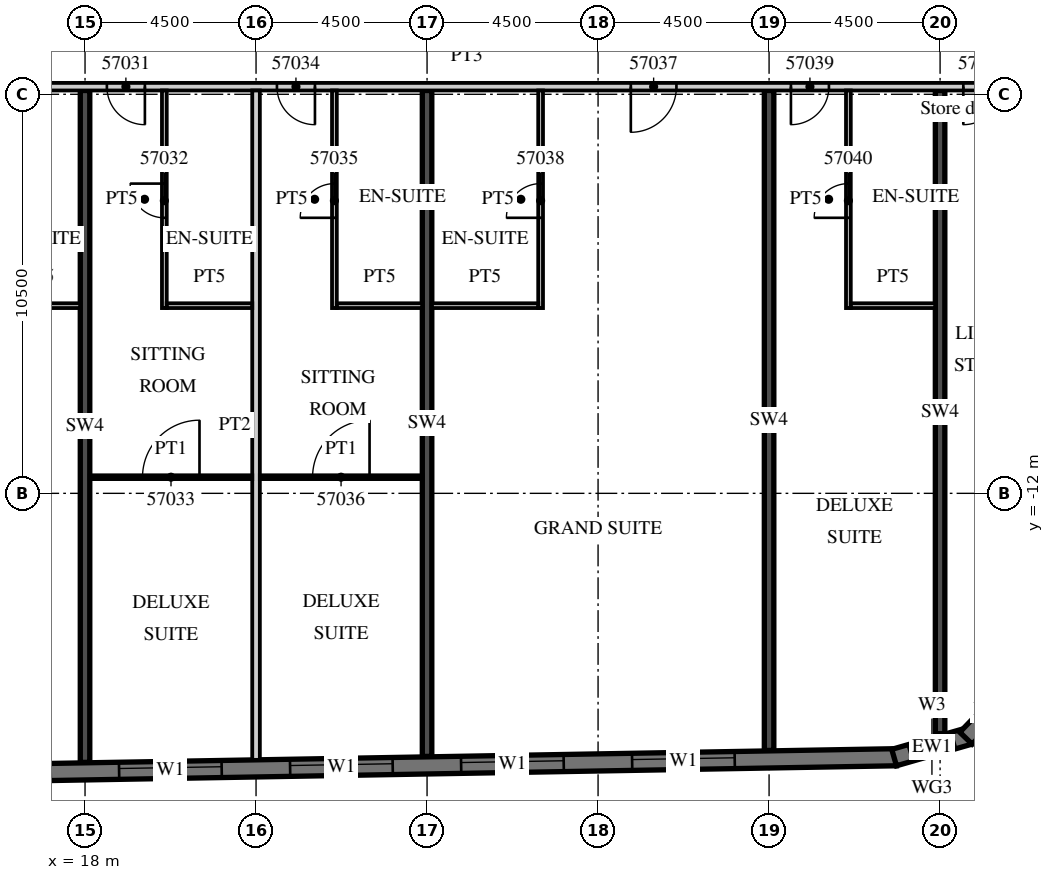
"""IFC4 building model, lengths in metres.
Left out: names, types, materials, properties, quantities, classifications, styles, units other than length and angle.
Written with IfcOpenShell. Run it as: python <this file> out.ifc"""

import sys

from ifc_helpers import new_model, si_unit, direction, frame, frame_2d, origin, place, context, subcontext, project, spatial, polyline, rectangle, outline, extrude, element, fill, save


model = new_model("IFC4")
c1 = context("Model", 3, precision=1e-05, world=origin(), true_north=direction((0.0, 1.0)))
c2 = subcontext(c1, "Body", "Model", "MODEL_VIEW")
j1 = project(units=[si_unit("LENGTHUNIT", "METRE"), si_unit("PLANEANGLEUNIT", "RADIAN")], contexts=[c1])
p1 = place(None, origin())
s1 = spatial("IfcSite", under=j1, at=p1, CompositionType="ELEMENT")
p2 = place(p1, origin())
s2 = spatial("IfcBuilding", under=s1, at=p2, CompositionType="ELEMENT")
p3 = place(p2, frame((0.0, 0.0, 234.2)))
s3 = spatial("IfcBuildingStorey", under=s2, at=p3, CompositionType="ELEMENT", Elevation=234.2)
p4 = place(p3, frame((18.0, -19.079, 0.0), z_axis=(0.0, 0.0, 1.0), x_axis=(0.0, 1.0, 0.0)))
e1 = element("IfcWall", 1, at=p4, inside=s3, PredefinedType="SHEAR", context=c2, shape_type="SweptSolid", body=[
    extrude(rectangle(XDim=17.679, YDim=0.25, at=frame_2d((8.84, 0.0))), origin(), (0.0, 0.0, 1.0), 3.3),
])
p5 = place(p3, frame((27.0, -18.922, 0.0), z_axis=(0.0, 0.0, 1.0), x_axis=(0.0, 1.0, 0.0)))
e2 = element("IfcWall", 2, at=p5, inside=s3, PredefinedType="SHEAR", context=c2, shape_type="SweptSolid", body=[
    extrude(rectangle(XDim=17.522, YDim=0.25, at=frame_2d((8.761, 0.0))), origin(), (0.0, 0.0, 1.0), 3.3),
])
p6 = place(p3, frame((36.0, -18.765, 0.0), z_axis=(0.0, 0.0, 1.0), x_axis=(0.0, 1.0, 0.0)))
e3 = element("IfcWall", 3, at=p6, inside=s3, PredefinedType="SHEAR", context=c2, shape_type="SweptSolid", body=[
    extrude(rectangle(XDim=17.365, YDim=0.25, at=frame_2d((8.683, 0.0))), origin(), (0.0, 0.0, 1.0), 3.3),
])
p7 = place(p3, frame((40.5, -18.325, 0.0), z_axis=(0.0, 0.0, 1.0), x_axis=(0.0, 1.0, 0.0)))
e4 = element("IfcWall", 4, at=p7, inside=s3, PredefinedType="SHEAR", context=c2, shape_type="SweptSolid", body=[
    extrude(rectangle(XDim=16.925, YDim=0.25, at=frame_2d((8.463, 0.0))), origin(), (0.0, 0.0, 1.0), 3.3),
])
p8 = place(p3, frame((-13.504, -19.866, 0.0), z_axis=(0.0, 0.0, 1.0), x_axis=(0.999847672978, 0.017453676992, 0.0)))
e5 = element("IfcWall", 5, at=p8, inside=s3, PredefinedType="SOLIDWALL", context=c2, shape_type="SweptSolid", body=[
    extrude(rectangle(XDim=52.86, YDim=0.45, at=frame_2d((26.43, 0.0))), origin(), (0.0, 0.0, 1.0), 3.02),
])
p9 = place(p8, frame((0.9, 0.0, 0.45)))
e6 = element("IfcOpeningElement", 6, at=p9, cuts=e5, PredefinedType="OPENING", context=c2, shape_type="SweptSolid", body=[
    extrude(rectangle(XDim=2.7, YDim=2.25, at=frame_2d((1.35, 1.125))), frame((0.0, 0.235, 0.0), z_axis=(0.0, -1.0, 0.0), x_axis=(1.0, 0.0, 0.0)), (0.0, 0.0, 1.0), 0.47),
])
p10 = place(p8, frame((5.401, 0.0, 0.45)))
e7 = element("IfcOpeningElement", 7, at=p10, cuts=e5, PredefinedType="OPENING", context=c2, shape_type="SweptSolid", body=[
    extrude(rectangle(XDim=2.7, YDim=2.25, at=frame_2d((1.35, 1.125))), frame((0.0, 0.235, 0.0), z_axis=(0.0, -1.0, 0.0), x_axis=(1.0, 0.0, 0.0)), (0.0, 0.0, 1.0), 0.47),
])
p11 = place(p8, frame((9.902, 0.0, 0.45)))
e8 = element("IfcOpeningElement", 8, at=p11, cuts=e5, PredefinedType="OPENING", context=c2, shape_type="SweptSolid", body=[
    extrude(rectangle(XDim=2.7, YDim=2.25, at=frame_2d((1.35, 1.125))), frame((0.0, 0.235, 0.0), z_axis=(0.0, -1.0, 0.0), x_axis=(1.0, 0.0, 0.0)), (0.0, 0.0, 1.0), 0.47),
])
p12 = place(p8, frame((14.402, 0.0, 0.45)))
e9 = element("IfcOpeningElement", 9, at=p12, cuts=e5, PredefinedType="OPENING", context=c2, shape_type="SweptSolid", body=[
    extrude(rectangle(XDim=2.7, YDim=2.25, at=frame_2d((1.35, 1.125))), frame((0.0, 0.235, 0.0), z_axis=(0.0, -1.0, 0.0), x_axis=(1.0, 0.0, 0.0)), (0.0, 0.0, 1.0), 0.47),
])
p13 = place(p8, frame((18.903, 0.0, 0.45)))
e10 = element("IfcOpeningElement", 10, at=p13, cuts=e5, PredefinedType="OPENING", context=c2, shape_type="SweptSolid", body=[
    extrude(rectangle(XDim=2.7, YDim=2.25, at=frame_2d((1.35, 1.125))), frame((0.0, 0.235, 0.0), z_axis=(0.0, -1.0, 0.0), x_axis=(1.0, 0.0, 0.0)), (0.0, 0.0, 1.0), 0.47),
])
p14 = place(p8, frame((23.404, 0.0, 0.45)))
e11 = element("IfcOpeningElement", 11, at=p14, cuts=e5, PredefinedType="OPENING", context=c2, shape_type="SweptSolid", body=[
    extrude(rectangle(XDim=2.7, YDim=2.25, at=frame_2d((1.35, 1.125))), frame((0.0, 0.235, 0.0), z_axis=(0.0, -1.0, 0.0), x_axis=(1.0, 0.0, 0.0)), (0.0, 0.0, 1.0), 0.47),
])
p15 = place(p8, frame((27.904, 0.0, 0.45)))
e12 = element("IfcOpeningElement", 12, at=p15, cuts=e5, PredefinedType="OPENING", context=c2, shape_type="SweptSolid", body=[
    extrude(rectangle(XDim=2.7, YDim=2.25, at=frame_2d((1.35, 1.125))), frame((0.0, 0.235, 0.0), z_axis=(0.0, -1.0, 0.0), x_axis=(1.0, 0.0, 0.0)), (0.0, 0.0, 1.0), 0.47),
])
p16 = place(p8, frame((32.405, 0.0, 0.45)))
e13 = element("IfcOpeningElement", 13, at=p16, cuts=e5, PredefinedType="OPENING", context=c2, shape_type="SweptSolid", body=[
    extrude(rectangle(XDim=2.7, YDim=2.25, at=frame_2d((1.35, 1.125))), frame((0.0, 0.235, 0.0), z_axis=(0.0, -1.0, 0.0), x_axis=(1.0, 0.0, 0.0)), (0.0, 0.0, 1.0), 0.47),
])
p17 = place(p8, frame((36.906, 0.0, 0.45)))
e14 = element("IfcOpeningElement", 14, at=p17, cuts=e5, PredefinedType="OPENING", context=c2, shape_type="SweptSolid", body=[
    extrude(rectangle(XDim=2.7, YDim=2.25, at=frame_2d((1.35, 1.125))), frame((0.0, 0.235, 0.0), z_axis=(0.0, -1.0, 0.0), x_axis=(1.0, 0.0, 0.0)), (0.0, 0.0, 1.0), 0.47),
])
p18 = place(p8, frame((41.406, 0.0, 0.45)))
e15 = element("IfcOpeningElement", 15, at=p18, cuts=e5, PredefinedType="OPENING", context=c2, shape_type="SweptSolid", body=[
    extrude(rectangle(XDim=2.7, YDim=2.25, at=frame_2d((1.35, 1.125))), frame((0.0, 0.235, 0.0), z_axis=(0.0, -1.0, 0.0), x_axis=(1.0, 0.0, 0.0)), (0.0, 0.0, 1.0), 0.47),
])
p19 = place(p8, frame((45.907, 0.0, 0.45)))
e16 = element("IfcOpeningElement", 16, at=p19, cuts=e5, PredefinedType="OPENING", context=c2, shape_type="SweptSolid", body=[
    extrude(rectangle(XDim=2.7, YDim=2.25, at=frame_2d((1.35, 1.125))), frame((0.0, 0.235, 0.0), z_axis=(0.0, -1.0, 0.0), x_axis=(1.0, 0.0, 0.0)), (0.0, 0.0, 1.0), 0.47),
])
p20 = place(p3, frame((39.29, -18.952, 0.0), z_axis=(0.0, 0.0, 1.0), x_axis=(0.961247584925, 0.275686562016, 0.0)))
e17 = element("IfcWall", 17, at=p20, inside=s3, PredefinedType="SOLIDWALL", context=c2, shape_type="SweptSolid", body=[
    extrude(outline(polyline([(0.0, -0.225), (2.071, -0.225), (1.95, 0.225), (0.121, 0.225), (0.0, -0.225)])), origin(), (0.0, 0.0, 1.0), 3.02),
])
p21 = place(p20, frame((0.435, 0.0, 0.45)))
e18 = element("IfcOpeningElement", 18, at=p21, cuts=e17, PredefinedType="OPENING", context=c2, shape_type="SweptSolid", body=[
    extrude(rectangle(XDim=1.2, YDim=2.25, at=frame_2d((0.6, 1.125))), frame((0.0, 0.235, 0.0), z_axis=(0.0, -1.0, 0.0), x_axis=(1.0, 0.0, 0.0)), (0.0, 0.0, 1.0), 0.47),
])
p22 = place(p3, frame((41.181, -18.442, 0.0), z_axis=(0.0, 0.0, 1.0), x_axis=(0.694678672846, 0.719320193998, 0.0)))
e19 = element("IfcWall", 19, at=p22, inside=s3, PredefinedType="SOLIDWALL", context=c2, shape_type="SweptSolid", body=[
    extrude(outline(polyline([(0.0, -0.225), (2.071, -0.225), (1.95, 0.225), (0.121, 0.225), (0.0, -0.225)])), origin(), (0.0, 0.0, 1.0), 3.02),
])
p23 = place(p3, frame((13.5, -1.3, 0.0), z_axis=(0.0, 0.0, 1.0), x_axis=(1.0, 0.0, 0.0)))
e20 = element("IfcWall", 20, at=p23, inside=s3, PredefinedType="PARTITIONING", context=c2, shape_type="SweptSolid", body=[
    extrude(rectangle(XDim=29.091, YDim=0.2, at=frame_2d((14.545, 0.0))), origin(), (0.0, 0.0, 1.0), 3.02),
])
p24 = place(p23, frame((0.575, 0.0, 0.0)))
e21 = element("IfcOpeningElement", 21, at=p24, cuts=e20, PredefinedType="OPENING", context=c2, shape_type="SweptSolid", body=[
    extrude(rectangle(XDim=1.0, YDim=2.1, at=frame_2d((0.5, 1.05))), frame((0.0, 0.11, 0.0), z_axis=(0.0, -1.0, 0.0), x_axis=(1.0, 0.0, 0.0)), (0.0, 0.0, 1.0), 0.22),
])
p25 = place(p23, frame((5.075, 0.0, 0.0)))
e22 = element("IfcOpeningElement", 22, at=p25, cuts=e20, PredefinedType="OPENING", context=c2, shape_type="SweptSolid", body=[
    extrude(rectangle(XDim=1.0, YDim=2.1, at=frame_2d((0.5, 1.05))), frame((0.0, 0.11, 0.0), z_axis=(0.0, -1.0, 0.0), x_axis=(1.0, 0.0, 0.0)), (0.0, 0.0, 1.0), 0.22),
])
p26 = place(p23, frame((9.55, 0.0, 0.0)))
e23 = element("IfcOpeningElement", 23, at=p26, cuts=e20, PredefinedType="OPENING", context=c2, shape_type="SweptSolid", body=[
    extrude(rectangle(XDim=1.0, YDim=2.1, at=frame_2d((0.5, 1.05))), frame((0.0, 0.11, 0.0), z_axis=(0.0, -1.0, 0.0), x_axis=(1.0, 0.0, 0.0)), (0.0, 0.0, 1.0), 0.22),
])
p27 = place(p23, frame((18.862, 0.0, 0.0)))
e24 = element("IfcOpeningElement", 24, at=p27, cuts=e20, PredefinedType="OPENING", context=c2, shape_type="SweptSolid", body=[
    extrude(rectangle(XDim=1.2, YDim=2.1, at=frame_2d((0.6, 1.05))), frame((0.0, 0.11, 0.0), z_axis=(0.0, -1.0, 0.0), x_axis=(1.0, 0.0, 0.0)), (0.0, 0.0, 1.0), 0.22),
])
p28 = place(p23, frame((23.075, 0.0, 0.0)))
e25 = element("IfcOpeningElement", 25, at=p28, cuts=e20, PredefinedType="OPENING", context=c2, shape_type="SweptSolid", body=[
    extrude(rectangle(XDim=1.0, YDim=2.1, at=frame_2d((0.5, 1.05))), frame((0.0, 0.11, 0.0), z_axis=(0.0, -1.0, 0.0), x_axis=(1.0, 0.0, 0.0)), (0.0, 0.0, 1.0), 0.22),
])
p29 = place(p23, frame((27.611, 0.0, 0.0)))
e26 = element("IfcOpeningElement", 26, at=p29, cuts=e20, PredefinedType="OPENING", context=c2, shape_type="SweptSolid", body=[
    extrude(rectangle(XDim=1.0, YDim=2.4, at=frame_2d((0.5, 1.2))), frame((0.0, 0.11, 0.0), z_axis=(0.0, -1.0, 0.0), x_axis=(1.0, 0.0, 0.0)), (0.0, 0.0, 1.0), 0.22),
])
p30 = place(p3, frame((15.625, -7.062, 0.0), z_axis=(0.0, 0.0, 1.0), x_axis=(1.0, 0.0, 0.0)))
e27 = element("IfcWall", 27, at=p30, inside=s3, PredefinedType="PARTITIONING", context=c2, shape_type="SweptSolid", body=[
    extrude(rectangle(XDim=2.25, YDim=0.125, at=frame_2d((1.125, 0.0))), origin(), (0.0, 0.0, 1.0), 3.02),
])
p31 = place(p3, frame((22.5, -19.013, 0.0), z_axis=(0.0, 0.0, 1.0), x_axis=(0.0, 1.0, 0.0)))
e28 = element("IfcWall", 28, at=p31, inside=s3, PredefinedType="PARTITIONING", context=c2, shape_type="SweptSolid", body=[
    extrude(rectangle(XDim=17.613, YDim=0.2, at=frame_2d((8.807, 0.0))), origin(), (0.0, 0.0, 1.0), 3.02),
])
p32 = place(p3, frame((20.087, -7.125, 0.0), z_axis=(0.0, 0.0, 1.0), x_axis=(0.0, 1.0, 0.0)))
e29 = element("IfcWall", 29, at=p32, inside=s3, PredefinedType="PARTITIONING", context=c2, shape_type="SweptSolid", body=[
    extrude(rectangle(XDim=5.725, YDim=0.125, at=frame_2d((2.863, 0.0))), origin(), (0.0, 0.0, 1.0), 3.02),
])
p33 = place(p32, frame((2.375, 0.0, 0.0)))
e30 = element("IfcOpeningElement", 30, at=p33, cuts=e29, PredefinedType="OPENING", context=c2, shape_type="SweptSolid", body=[
    extrude(rectangle(XDim=0.9, YDim=2.1, at=frame_2d((0.45, 1.05))), frame((0.0, 0.073, 0.0), z_axis=(0.0, -1.0, 0.0), x_axis=(1.0, 0.0, 0.0)), (0.0, 0.0, 1.0), 0.145),
])
p34 = place(p3, frame((20.15, -7.062, 0.0), z_axis=(0.0, 0.0, 1.0), x_axis=(1.0, 0.0, 0.0)))
e31 = element("IfcWall", 31, at=p34, inside=s3, PredefinedType="PARTITIONING", context=c2, shape_type="SweptSolid", body=[
    extrude(rectangle(XDim=2.25, YDim=0.125, at=frame_2d((1.125, 0.0))), origin(), (0.0, 0.0, 1.0), 3.02),
])
p35 = place(p3, frame((18.125, -11.575, 0.0), z_axis=(0.0, 0.0, 1.0), x_axis=(1.0, 0.0, 0.0)))
e32 = element("IfcWall", 32, at=p35, inside=s3, PredefinedType="PARTITIONING", context=c2, shape_type="SweptSolid", body=[
    extrude(rectangle(XDim=4.275, YDim=0.1, at=frame_2d((2.137, 0.0))), origin(), (0.0, 0.0, 1.0), 3.02),
])
p36 = place(p35, frame((1.387, 0.0, 0.0)))
e33 = element("IfcOpeningElement", 33, at=p36, cuts=e32, PredefinedType="OPENING", context=c2, shape_type="SweptSolid", body=[
    extrude(rectangle(XDim=1.5, YDim=2.1, at=frame_2d((0.75, 1.05))), frame((0.0, 0.06, 0.0), z_axis=(0.0, -1.0, 0.0), x_axis=(1.0, 0.0, 0.0)), (0.0, 0.0, 1.0), 0.12),
])
p37 = place(p3, frame((24.562, -7.125, 0.0), z_axis=(0.0, 0.0, 1.0), x_axis=(0.0, 1.0, 0.0)))
e34 = element("IfcWall", 34, at=p37, inside=s3, PredefinedType="PARTITIONING", context=c2, shape_type="SweptSolid", body=[
    extrude(rectangle(XDim=5.725, YDim=0.125, at=frame_2d((2.863, 0.0))), origin(), (0.0, 0.0, 1.0), 3.02),
])
p38 = place(p37, frame((2.375, 0.0, 0.0)))
e35 = element("IfcOpeningElement", 35, at=p38, cuts=e34, PredefinedType="OPENING", context=c2, shape_type="SweptSolid", body=[
    extrude(rectangle(XDim=0.9, YDim=2.1, at=frame_2d((0.45, 1.05))), frame((0.0, 0.073, 0.0), z_axis=(0.0, -1.0, 0.0), x_axis=(1.0, 0.0, 0.0)), (0.0, 0.0, 1.0), 0.145),
])
p39 = place(p3, frame((24.625, -7.062, 0.0), z_axis=(0.0, 0.0, 1.0), x_axis=(1.0, 0.0, 0.0)))
e36 = element("IfcWall", 36, at=p39, inside=s3, PredefinedType="PARTITIONING", context=c2, shape_type="SweptSolid", body=[
    extrude(rectangle(XDim=2.25, YDim=0.125, at=frame_2d((1.125, 0.0))), origin(), (0.0, 0.0, 1.0), 3.02),
])
p40 = place(p3, frame((22.6, -11.575, 0.0), z_axis=(0.0, 0.0, 1.0), x_axis=(1.0, 0.0, 0.0)))
e37 = element("IfcWall", 37, at=p40, inside=s3, PredefinedType="PARTITIONING", context=c2, shape_type="SweptSolid", body=[
    extrude(rectangle(XDim=4.275, YDim=0.1, at=frame_2d((2.137, 0.0))), origin(), (0.0, 0.0, 1.0), 3.02),
])
p41 = place(p40, frame((1.387, 0.0, 0.0)))
e38 = element("IfcOpeningElement", 38, at=p41, cuts=e37, PredefinedType="OPENING", context=c2, shape_type="SweptSolid", body=[
    extrude(rectangle(XDim=1.5, YDim=2.1, at=frame_2d((0.75, 1.05))), frame((0.0, 0.06, 0.0), z_axis=(0.0, -1.0, 0.0), x_axis=(1.0, 0.0, 0.0)), (0.0, 0.0, 1.0), 0.12),
])
p42 = place(p3, frame((29.988, -7.125, 0.0), z_axis=(0.0, 0.0, 1.0), x_axis=(0.0, 1.0, 0.0)))
e39 = element("IfcWall", 39, at=p42, inside=s3, PredefinedType="PARTITIONING", context=c2, shape_type="SweptSolid", body=[
    extrude(rectangle(XDim=5.725, YDim=0.125, at=frame_2d((2.863, 0.0))), origin(), (0.0, 0.0, 1.0), 3.02),
])
p43 = place(p42, frame((2.375, 0.0, 0.0)))
e40 = element("IfcOpeningElement", 40, at=p43, cuts=e39, PredefinedType="OPENING", context=c2, shape_type="SweptSolid", body=[
    extrude(rectangle(XDim=0.9, YDim=2.1, at=frame_2d((0.45, 1.05))), frame((0.0, 0.073, 0.0), z_axis=(0.0, -1.0, 0.0), x_axis=(1.0, 0.0, 0.0)), (0.0, 0.0, 1.0), 0.145),
])
p44 = place(p3, frame((27.125, -7.062, 0.0), z_axis=(0.0, 0.0, 1.0), x_axis=(1.0, 0.0, 0.0)))
e41 = element("IfcWall", 41, at=p44, inside=s3, PredefinedType="PARTITIONING", context=c2, shape_type="SweptSolid", body=[
    extrude(rectangle(XDim=2.8, YDim=0.125, at=frame_2d((1.4, 0.0))), origin(), (0.0, 0.0, 1.0), 3.02),
])
p45 = place(p3, frame((38.087, -7.125, 0.0), z_axis=(0.0, 0.0, 1.0), x_axis=(0.0, 1.0, 0.0)))
e42 = element("IfcWall", 42, at=p45, inside=s3, PredefinedType="PARTITIONING", context=c2, shape_type="SweptSolid", body=[
    extrude(rectangle(XDim=5.725, YDim=0.125, at=frame_2d((2.863, 0.0))), origin(), (0.0, 0.0, 1.0), 3.02),
])
p46 = place(p45, frame((2.375, 0.0, 0.0)))
e43 = element("IfcOpeningElement", 43, at=p46, cuts=e42, PredefinedType="OPENING", context=c2, shape_type="SweptSolid", body=[
    extrude(rectangle(XDim=0.9, YDim=2.1, at=frame_2d((0.45, 1.05))), frame((0.0, 0.073, 0.0), z_axis=(0.0, -1.0, 0.0), x_axis=(1.0, 0.0, 0.0)), (0.0, 0.0, 1.0), 0.145),
])
p47 = place(p3, frame((38.15, -7.062, 0.0), z_axis=(0.0, 0.0, 1.0), x_axis=(1.0, 0.0, 0.0)))
e44 = element("IfcWall", 44, at=p47, inside=s3, PredefinedType="PARTITIONING", context=c2, shape_type="SweptSolid", body=[
    extrude(rectangle(XDim=2.225, YDim=0.125, at=frame_2d((1.113, 0.0))), origin(), (0.0, 0.0, 1.0), 3.02),
])
p48 = place(p16, origin())
e45 = element("IfcWindow", 45, at=p48, inside=s3, PartitioningType="SINGLE_PANEL", PredefinedType="WINDOW", context=c2, shape_type="SweptSolid", body=[
    extrude(rectangle(XDim=2.7, YDim=2.25, at=frame_2d((1.35, 1.125))), frame((0.0, 0.09, 0.0), z_axis=(0.0, -1.0, 0.0), x_axis=(1.0, 0.0, 0.0)), (0.0, 0.0, 1.0), 0.06),
])
fill(e13, e45)
p49 = place(p17, origin())
e46 = element("IfcWindow", 46, at=p49, inside=s3, PartitioningType="SINGLE_PANEL", PredefinedType="WINDOW", context=c2, shape_type="SweptSolid", body=[
    extrude(rectangle(XDim=2.7, YDim=2.25, at=frame_2d((1.35, 1.125))), frame((0.0, 0.09, 0.0), z_axis=(0.0, -1.0, 0.0), x_axis=(1.0, 0.0, 0.0)), (0.0, 0.0, 1.0), 0.06),
])
fill(e14, e46)
p50 = place(p18, origin())
e47 = element("IfcWindow", 47, at=p50, inside=s3, PartitioningType="SINGLE_PANEL", PredefinedType="WINDOW", context=c2, shape_type="SweptSolid", body=[
    extrude(rectangle(XDim=2.7, YDim=2.25, at=frame_2d((1.35, 1.125))), frame((0.0, 0.09, 0.0), z_axis=(0.0, -1.0, 0.0), x_axis=(1.0, 0.0, 0.0)), (0.0, 0.0, 1.0), 0.06),
])
fill(e15, e47)
p51 = place(p19, origin())
e48 = element("IfcWindow", 48, at=p51, inside=s3, PartitioningType="SINGLE_PANEL", PredefinedType="WINDOW", context=c2, shape_type="SweptSolid", body=[
    extrude(rectangle(XDim=2.7, YDim=2.25, at=frame_2d((1.35, 1.125))), frame((0.0, 0.09, 0.0), z_axis=(0.0, -1.0, 0.0), x_axis=(1.0, 0.0, 0.0)), (0.0, 0.0, 1.0), 0.06),
])
fill(e16, e48)
p52 = place(p21, origin())
e49 = element("IfcWindow", 49, at=p52, inside=s3, PartitioningType="SINGLE_PANEL", PredefinedType="WINDOW", context=c2, shape_type="SweptSolid", body=[
    extrude(rectangle(XDim=1.2, YDim=2.25, at=frame_2d((0.6, 1.125))), frame((0.0, 0.09, 0.0), z_axis=(0.0, -1.0, 0.0), x_axis=(1.0, 0.0, 0.0)), (0.0, 0.0, 1.0), 0.06),
])
fill(e18, e49)
p53 = place(p25, origin())
e50 = element("IfcDoor", 50, at=p53, inside=s3, OperationType="SINGLE_SWING_RIGHT", PredefinedType="DOOR", context=c2, shape_type="SweptSolid", body=[
    extrude(rectangle(XDim=1.0, YDim=2.1, at=frame_2d((0.5, 1.05))), frame((0.0, 0.025, 0.0), z_axis=(0.0, -1.0, 0.0), x_axis=(1.0, 0.0, 0.0)), (0.0, 0.0, 1.0), 0.05),
])
fill(e22, e50)
p54 = place(p33, origin())
e51 = element("IfcDoor", 51, at=p54, inside=s3, OperationType="SINGLE_SWING_RIGHT", PredefinedType="DOOR", context=c2, shape_type="SweptSolid", body=[
    extrude(rectangle(XDim=0.9, YDim=2.1, at=frame_2d((0.45, 1.05))), frame((0.0, 0.025, 0.0), z_axis=(0.0, -1.0, 0.0), x_axis=(1.0, 0.0, 0.0)), (0.0, 0.0, 1.0), 0.05),
])
fill(e30, e51)
p55 = place(p36, origin())
e52 = element("IfcDoor", 52, at=p55, inside=s3, OperationType="SINGLE_SWING_RIGHT", PredefinedType="DOOR", context=c2, shape_type="SweptSolid", body=[
    extrude(rectangle(XDim=1.5, YDim=2.1, at=frame_2d((0.75, 1.05))), frame((0.0, 0.025, 0.0), z_axis=(0.0, -1.0, 0.0), x_axis=(1.0, 0.0, 0.0)), (0.0, 0.0, 1.0), 0.05),
])
fill(e33, e52)
p56 = place(p26, origin())
e53 = element("IfcDoor", 53, at=p56, inside=s3, OperationType="SINGLE_SWING_RIGHT", PredefinedType="DOOR", context=c2, shape_type="SweptSolid", body=[
    extrude(rectangle(XDim=1.0, YDim=2.1, at=frame_2d((0.5, 1.05))), frame((0.0, 0.025, 0.0), z_axis=(0.0, -1.0, 0.0), x_axis=(1.0, 0.0, 0.0)), (0.0, 0.0, 1.0), 0.05),
])
fill(e23, e53)
p57 = place(p38, origin())
e54 = element("IfcDoor", 54, at=p57, inside=s3, OperationType="SINGLE_SWING_LEFT", PredefinedType="DOOR", context=c2, shape_type="SweptSolid", body=[
    extrude(rectangle(XDim=0.9, YDim=2.1, at=frame_2d((0.45, 1.05))), frame((0.0, 0.025, 0.0), z_axis=(0.0, -1.0, 0.0), x_axis=(1.0, 0.0, 0.0)), (0.0, 0.0, 1.0), 0.05),
])
fill(e35, e54)
p58 = place(p41, origin())
e55 = element("IfcDoor", 55, at=p58, inside=s3, OperationType="SINGLE_SWING_RIGHT", PredefinedType="DOOR", context=c2, shape_type="SweptSolid", body=[
    extrude(rectangle(XDim=1.5, YDim=2.1, at=frame_2d((0.75, 1.05))), frame((0.0, 0.025, 0.0), z_axis=(0.0, -1.0, 0.0), x_axis=(1.0, 0.0, 0.0)), (0.0, 0.0, 1.0), 0.05),
])
fill(e38, e55)
p59 = place(p27, origin())
e56 = element("IfcDoor", 56, at=p59, inside=s3, OperationType="SINGLE_SWING_LEFT", PredefinedType="DOOR", context=c2, shape_type="SweptSolid", body=[
    extrude(rectangle(XDim=1.2, YDim=2.1, at=frame_2d((0.6, 1.05))), frame((0.0, 0.025, 0.0), z_axis=(0.0, -1.0, 0.0), x_axis=(1.0, 0.0, 0.0)), (0.0, 0.0, 1.0), 0.05),
])
fill(e24, e56)
p60 = place(p43, origin())
e57 = element("IfcDoor", 57, at=p60, inside=s3, OperationType="SINGLE_SWING_LEFT", PredefinedType="DOOR", context=c2, shape_type="SweptSolid", body=[
    extrude(rectangle(XDim=0.9, YDim=2.1, at=frame_2d((0.45, 1.05))), frame((0.0, 0.025, 0.0), z_axis=(0.0, -1.0, 0.0), x_axis=(1.0, 0.0, 0.0)), (0.0, 0.0, 1.0), 0.05),
])
fill(e40, e57)
p61 = place(p28, origin())
e58 = element("IfcDoor", 58, at=p61, inside=s3, OperationType="SINGLE_SWING_LEFT", PredefinedType="DOOR", context=c2, shape_type="SweptSolid", body=[
    extrude(rectangle(XDim=1.0, YDim=2.1, at=frame_2d((0.5, 1.05))), frame((0.0, 0.025, 0.0), z_axis=(0.0, -1.0, 0.0), x_axis=(1.0, 0.0, 0.0)), (0.0, 0.0, 1.0), 0.05),
])
fill(e25, e58)
p62 = place(p46, origin())
e59 = element("IfcDoor", 59, at=p62, inside=s3, OperationType="SINGLE_SWING_LEFT", PredefinedType="DOOR", context=c2, shape_type="SweptSolid", body=[
    extrude(rectangle(XDim=0.9, YDim=2.1, at=frame_2d((0.45, 1.05))), frame((0.0, 0.025, 0.0), z_axis=(0.0, -1.0, 0.0), x_axis=(1.0, 0.0, 0.0)), (0.0, 0.0, 1.0), 0.05),
])
fill(e43, e59)
p63 = place(p29, origin())
e60 = element("IfcDoor", 60, at=p63, inside=s3, OperationType="SINGLE_SWING_LEFT", PredefinedType="DOOR", context=c2, shape_type="SweptSolid", body=[
    extrude(rectangle(XDim=1.0, YDim=2.4, at=frame_2d((0.5, 1.2))), frame((0.0, 0.025, 0.0), z_axis=(0.0, -1.0, 0.0), x_axis=(1.0, 0.0, 0.0)), (0.0, 0.0, 1.0), 0.05),
])
fill(e26, e60)
save(model, sys.argv[1])
